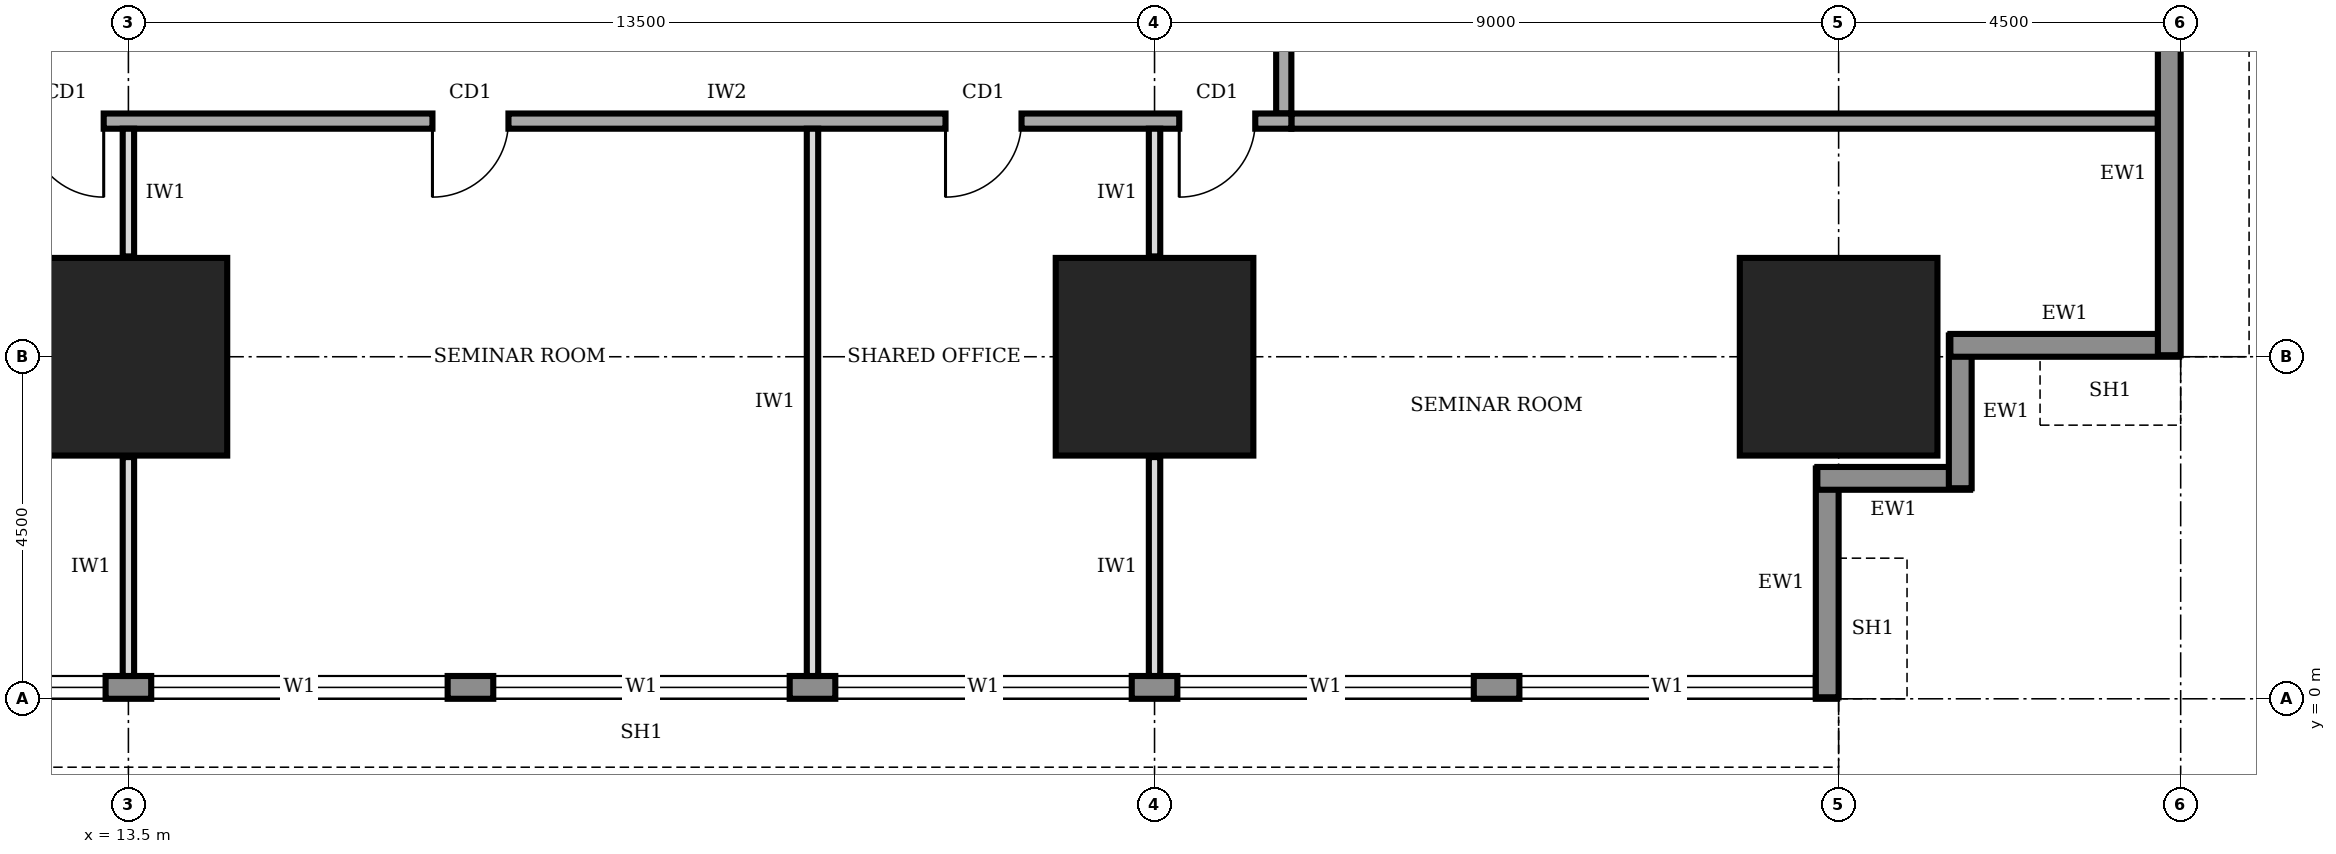
"""IFC4 building model, lengths in metres.
Left out: names, types, materials, properties, quantities, classifications, styles, units other than length and angle.
Written with IfcOpenShell. Run it as: python <this file> out.ifc"""

import sys

from ifc_helpers import new_model, si_unit, direction, frame, frame_2d, origin, origin_2d, place, context, subcontext, project, spatial, rectangle, extrude, element, fill, save


model = new_model("IFC4")
c1 = context("Model", 3, precision=1e-05, world=origin(), true_north=direction((0.0, 1.0)))
c2 = subcontext(c1, "Body", "Model", "MODEL_VIEW")
j1 = project(units=[si_unit("LENGTHUNIT", "METRE"), si_unit("PLANEANGLEUNIT", "RADIAN")], contexts=[c1])
p1 = place(None, origin())
s1 = spatial("IfcSite", under=j1, at=p1, CompositionType="ELEMENT")
p2 = place(p1, origin())
s2 = spatial("IfcBuilding", under=s1, at=p2, CompositionType="ELEMENT")
p3 = place(p2, frame((0.0, 0.0, 25.0)))
s3 = spatial("IfcBuildingStorey", under=s2, at=p3, CompositionType="ELEMENT", Elevation=25.0)
for number, where, z_axis, x_axis in (
    (1, (13.5, 4.5, 0.0), (0.0, 0.0, 1.0), (1.0, 0.0, 0.0)),
    (2, (27.0, 4.5, 0.0), (0.0, 0.0, 1.0), (1.0, 0.0, 0.0)),
    (3, (36.0, 4.5, 0.0), (0.0, 0.0, 1.0), (1.0, 0.0, 0.0)),
):
    element("IfcColumn", number, at=place(p3, frame(where, z_axis=z_axis, x_axis=x_axis)), inside=s3, PredefinedType="COLUMN", context=c2, shape_type="SweptSolid", body=[
        extrude(rectangle(XDim=2.6, YDim=2.6, at=origin_2d()), origin(), (0.0, 0.0, 1.0), 4.0),
    ])
p4 = place(p3, frame((4.52, 0.15, 0.0), z_axis=(0.0, 0.0, 1.0), x_axis=(1.0, 0.0, 0.0)))
e4 = element("IfcWall", 4, at=p4, inside=s3, PredefinedType="STANDARD", context=c2, shape_type="SweptSolid", body=[
    extrude(rectangle(XDim=31.46, YDim=0.3, at=frame_2d((15.73, 0.0))), origin(), (0.0, 0.0, 1.0), 3.75),
])
p5 = place(p4, frame((4.78, 0.0, 0.9)))
e5 = element("IfcOpeningElement", 5, at=p5, cuts=e4, PredefinedType="OPENING", context=c2, shape_type="SweptSolid", body=[
    extrude(rectangle(XDim=3.9, YDim=2.2, at=frame_2d((1.95, 1.1))), frame((0.0, 0.16, 0.0), z_axis=(0.0, -1.0, 0.0), x_axis=(1.0, 0.0, 0.0)), (0.0, 0.0, 1.0), 0.32),
])
p6 = place(p4, frame((9.28, 0.0, 0.9)))
e6 = element("IfcOpeningElement", 6, at=p6, cuts=e4, PredefinedType="OPENING", context=c2, shape_type="SweptSolid", body=[
    extrude(rectangle(XDim=3.9, YDim=2.2, at=frame_2d((1.95, 1.1))), frame((0.0, 0.16, 0.0), z_axis=(0.0, -1.0, 0.0), x_axis=(1.0, 0.0, 0.0)), (0.0, 0.0, 1.0), 0.32),
])
p7 = place(p4, frame((13.78, 0.0, 0.9)))
e7 = element("IfcOpeningElement", 7, at=p7, cuts=e4, PredefinedType="OPENING", context=c2, shape_type="SweptSolid", body=[
    extrude(rectangle(XDim=3.9, YDim=2.2, at=frame_2d((1.95, 1.1))), frame((0.0, 0.16, 0.0), z_axis=(0.0, -1.0, 0.0), x_axis=(1.0, 0.0, 0.0)), (0.0, 0.0, 1.0), 0.32),
])
p8 = place(p4, frame((18.28, 0.0, 0.9)))
e8 = element("IfcOpeningElement", 8, at=p8, cuts=e4, PredefinedType="OPENING", context=c2, shape_type="SweptSolid", body=[
    extrude(rectangle(XDim=3.9, YDim=2.2, at=frame_2d((1.95, 1.1))), frame((0.0, 0.16, 0.0), z_axis=(0.0, -1.0, 0.0), x_axis=(1.0, 0.0, 0.0)), (0.0, 0.0, 1.0), 0.32),
])
p9 = place(p4, frame((22.78, 0.0, 0.9)))
e9 = element("IfcOpeningElement", 9, at=p9, cuts=e4, PredefinedType="OPENING", context=c2, shape_type="SweptSolid", body=[
    extrude(rectangle(XDim=3.9, YDim=2.2, at=frame_2d((1.95, 1.1))), frame((0.0, 0.16, 0.0), z_axis=(0.0, -1.0, 0.0), x_axis=(1.0, 0.0, 0.0)), (0.0, 0.0, 1.0), 0.32),
])
p10 = place(p4, frame((27.28, 0.0, 0.9)))
e10 = element("IfcOpeningElement", 10, at=p10, cuts=e4, PredefinedType="OPENING", context=c2, shape_type="SweptSolid", body=[
    extrude(rectangle(XDim=3.9, YDim=2.2, at=frame_2d((1.95, 1.1))), frame((0.0, 0.16, 0.0), z_axis=(0.0, -1.0, 0.0), x_axis=(1.0, 0.0, 0.0)), (0.0, 0.0, 1.0), 0.32),
])
p11 = place(p3, frame((35.85, 0.02, 0.0), z_axis=(0.0, 0.0, 1.0), x_axis=(0.0, 1.0, 0.0)))
e11 = element("IfcWall", 11, at=p11, inside=s3, PredefinedType="STANDARD", context=c2, shape_type="SweptSolid", body=[
    extrude(rectangle(XDim=3.01, YDim=0.3, at=frame_2d((1.505, 0.0))), origin(), (0.0, 0.0, 1.0), 2.85),
])
for number, where, z_axis, x_axis in (
    (12, (35.72, 2.9, 0.0), (0.0, 0.0, 1.0), (1.0, 0.0, 0.0)),
    (13, (37.6, 2.77, 0.0), (0.0, 0.0, 1.0), (0.0, 1.0, 0.0)),
):
    element("IfcWall", number, at=place(p3, frame(where, z_axis=z_axis, x_axis=x_axis)), inside=s3, PredefinedType="STANDARD", context=c2, shape_type="SweptSolid", body=[
        extrude(rectangle(XDim=2.01, YDim=0.3, at=frame_2d((1.005, 0.0))), origin(), (0.0, 0.0, 1.0), 3.75),
    ])
p12 = place(p3, frame((37.47, 4.65, 0.0), z_axis=(0.0, 0.0, 1.0), x_axis=(1.0, 0.0, 0.0)))
e14 = element("IfcWall", 14, at=p12, inside=s3, PredefinedType="STANDARD", context=c2, shape_type="SweptSolid", body=[
    extrude(rectangle(XDim=3.01, YDim=0.3, at=frame_2d((1.505, 0.0))), origin(), (0.0, 0.0, 1.0), 2.85),
])
p13 = place(p3, frame((40.35, 4.52, 0.0), z_axis=(0.0, 0.0, 1.0), x_axis=(0.0, 1.0, 0.0)))
e15 = element("IfcWall", 15, at=p13, inside=s3, PredefinedType="STANDARD", context=c2, shape_type="SweptSolid", body=[
    extrude(rectangle(XDim=31.46, YDim=0.3, at=frame_2d((15.73, 0.0))), origin(), (0.0, 0.0, 1.0), 3.75),
])
p14 = place(p13, frame((4.78, 0.0, 0.9)))
e16 = element("IfcOpeningElement", 16, at=p14, cuts=e15, PredefinedType="OPENING", context=c2, shape_type="SweptSolid", body=[
    extrude(rectangle(XDim=3.9, YDim=2.2, at=frame_2d((1.95, 1.1))), frame((0.0, 0.16, 0.0), z_axis=(0.0, -1.0, 0.0), x_axis=(1.0, 0.0, 0.0)), (0.0, 0.0, 1.0), 0.32),
])
p15 = place(p13, frame((9.28, 0.0, 0.9)))
e17 = element("IfcOpeningElement", 17, at=p15, cuts=e15, PredefinedType="OPENING", context=c2, shape_type="SweptSolid", body=[
    extrude(rectangle(XDim=3.9, YDim=2.2, at=frame_2d((1.95, 1.1))), frame((0.0, 0.16, 0.0), z_axis=(0.0, -1.0, 0.0), x_axis=(1.0, 0.0, 0.0)), (0.0, 0.0, 1.0), 0.32),
])
p16 = place(p13, frame((13.78, 0.0, 0.9)))
e18 = element("IfcOpeningElement", 18, at=p16, cuts=e15, PredefinedType="OPENING", context=c2, shape_type="SweptSolid", body=[
    extrude(rectangle(XDim=3.9, YDim=2.2, at=frame_2d((1.95, 1.1))), frame((0.0, 0.16, 0.0), z_axis=(0.0, -1.0, 0.0), x_axis=(1.0, 0.0, 0.0)), (0.0, 0.0, 1.0), 0.32),
])
p17 = place(p13, frame((18.28, 0.0, 0.9)))
e19 = element("IfcOpeningElement", 19, at=p17, cuts=e15, PredefinedType="OPENING", context=c2, shape_type="SweptSolid", body=[
    extrude(rectangle(XDim=3.9, YDim=2.2, at=frame_2d((1.95, 1.1))), frame((0.0, 0.16, 0.0), z_axis=(0.0, -1.0, 0.0), x_axis=(1.0, 0.0, 0.0)), (0.0, 0.0, 1.0), 0.32),
])
p18 = place(p13, frame((22.78, 0.0, 0.9)))
e20 = element("IfcOpeningElement", 20, at=p18, cuts=e15, PredefinedType="OPENING", context=c2, shape_type="SweptSolid", body=[
    extrude(rectangle(XDim=3.9, YDim=2.2, at=frame_2d((1.95, 1.1))), frame((0.0, 0.16, 0.0), z_axis=(0.0, -1.0, 0.0), x_axis=(1.0, 0.0, 0.0)), (0.0, 0.0, 1.0), 0.32),
])
p19 = place(p13, frame((27.28, 0.0, 0.9)))
e21 = element("IfcOpeningElement", 21, at=p19, cuts=e15, PredefinedType="OPENING", context=c2, shape_type="SweptSolid", body=[
    extrude(rectangle(XDim=3.9, YDim=2.2, at=frame_2d((1.95, 1.1))), frame((0.0, 0.16, 0.0), z_axis=(0.0, -1.0, 0.0), x_axis=(1.0, 0.0, 0.0)), (0.0, 0.0, 1.0), 0.32),
])
p20 = place(p3, frame((11.9, 7.6, 0.0), z_axis=(0.0, 0.0, 1.0), x_axis=(1.0, 0.0, 0.0)))
e22 = element("IfcWall", 22, at=p20, inside=s3, PredefinedType="SOLIDWALL", context=c2, shape_type="SweptSolid", body=[
    extrude(rectangle(XDim=16.9, YDim=0.2, at=frame_2d((8.45, 0.0))), origin(), (0.0, 0.0, 1.0), 3.75),
])
p21 = place(p20, frame((0.275, 0.0, 0.0)))
e23 = element("IfcOpeningElement", 23, at=p21, cuts=e22, PredefinedType="OPENING", context=c2, shape_type="SweptSolid", body=[
    extrude(rectangle(XDim=1.0, YDim=2.1, at=frame_2d((0.5, 1.05))), frame((0.0, 0.11, 0.0), z_axis=(0.0, -1.0, 0.0), x_axis=(1.0, 0.0, 0.0)), (0.0, 0.0, 1.0), 0.22),
])
p22 = place(p20, frame((5.6, 0.0, 0.0)))
e24 = element("IfcOpeningElement", 24, at=p22, cuts=e22, PredefinedType="OPENING", context=c2, shape_type="SweptSolid", body=[
    extrude(rectangle(XDim=1.0, YDim=2.1, at=frame_2d((0.5, 1.05))), frame((0.0, 0.11, 0.0), z_axis=(0.0, -1.0, 0.0), x_axis=(1.0, 0.0, 0.0)), (0.0, 0.0, 1.0), 0.22),
])
p23 = place(p20, frame((12.35, 0.0, 0.0)))
e25 = element("IfcOpeningElement", 25, at=p23, cuts=e22, PredefinedType="OPENING", context=c2, shape_type="SweptSolid", body=[
    extrude(rectangle(XDim=1.0, YDim=2.1, at=frame_2d((0.5, 1.05))), frame((0.0, 0.11, 0.0), z_axis=(0.0, -1.0, 0.0), x_axis=(1.0, 0.0, 0.0)), (0.0, 0.0, 1.0), 0.22),
])
p24 = place(p20, frame((15.425, 0.0, 0.0)))
e26 = element("IfcOpeningElement", 26, at=p24, cuts=e22, PredefinedType="OPENING", context=c2, shape_type="SweptSolid", body=[
    extrude(rectangle(XDim=1.0, YDim=2.1, at=frame_2d((0.5, 1.05))), frame((0.0, 0.11, 0.0), z_axis=(0.0, -1.0, 0.0), x_axis=(1.0, 0.0, 0.0)), (0.0, 0.0, 1.0), 0.22),
])
p25 = place(p3, frame((28.7, 7.7, 0.0), z_axis=(0.0, 0.0, 1.0), x_axis=(0.0, 1.0, 0.0)))
e27 = element("IfcWall", 27, at=p25, inside=s3, PredefinedType="SOLIDWALL", context=c2, shape_type="SweptSolid", body=[
    extrude(rectangle(XDim=23.8, YDim=0.2, at=frame_2d((11.9, 0.0))), origin(), (0.0, 0.0, 1.0), 3.75),
])
p26 = place(p25, frame((2.3, 0.0, 0.0)))
e28 = element("IfcOpeningElement", 28, at=p26, cuts=e27, PredefinedType="OPENING", context=c2, shape_type="SweptSolid", body=[
    extrude(rectangle(XDim=1.0, YDim=2.1, at=frame_2d((0.5, 1.05))), frame((0.0, 0.11, 0.0), z_axis=(0.0, -1.0, 0.0), x_axis=(1.0, 0.0, 0.0)), (0.0, 0.0, 1.0), 0.22),
])
p27 = place(p25, frame((7.55, 0.0, 0.0)))
e29 = element("IfcOpeningElement", 29, at=p27, cuts=e27, PredefinedType="OPENING", context=c2, shape_type="SweptSolid", body=[
    extrude(rectangle(XDim=1.0, YDim=2.1, at=frame_2d((0.5, 1.05))), frame((0.0, 0.11, 0.0), z_axis=(0.0, -1.0, 0.0), x_axis=(1.0, 0.0, 0.0)), (0.0, 0.0, 1.0), 0.22),
])
p28 = place(p25, frame((12.05, 0.0, 0.0)))
e30 = element("IfcOpeningElement", 30, at=p28, cuts=e27, PredefinedType="OPENING", context=c2, shape_type="SweptSolid", body=[
    extrude(rectangle(XDim=1.0, YDim=2.1, at=frame_2d((0.5, 1.05))), frame((0.0, 0.11, 0.0), z_axis=(0.0, -1.0, 0.0), x_axis=(1.0, 0.0, 0.0)), (0.0, 0.0, 1.0), 0.22),
])
p29 = place(p25, frame((18.4, 0.0, 0.0)))
e31 = element("IfcOpeningElement", 31, at=p29, cuts=e27, PredefinedType="OPENING", context=c2, shape_type="SweptSolid", body=[
    extrude(rectangle(XDim=1.8, YDim=2.1, at=frame_2d((0.9, 1.05))), frame((0.0, 0.11, 0.0), z_axis=(0.0, -1.0, 0.0), x_axis=(1.0, 0.0, 0.0)), (0.0, 0.0, 1.0), 0.22),
])
p30 = place(p3, frame((28.8, 7.6, 0.0), z_axis=(0.0, 0.0, 1.0), x_axis=(1.0, 0.0, 0.0)))
e32 = element("IfcWall", 32, at=p30, inside=s3, PredefinedType="SOLIDWALL", context=c2, shape_type="SweptSolid", body=[
    extrude(rectangle(XDim=11.4, YDim=0.2, at=frame_2d((5.7, 0.0))), origin(), (0.0, 0.0, 1.0), 3.75),
])
p31 = place(p3, frame((13.5, 0.3, 0.0), z_axis=(0.0, 0.0, 1.0), x_axis=(0.0, 1.0, 0.0)))
e33 = element("IfcWall", 33, at=p31, inside=s3, PredefinedType="PARTITIONING", context=c2, shape_type="SweptSolid", body=[
    extrude(rectangle(XDim=2.88, YDim=0.15, at=frame_2d((1.44, 0.0))), origin(), (0.0, 0.0, 1.0), 2.85),
])
p32 = place(p3, frame((13.5, 5.82, 0.0), z_axis=(0.0, 0.0, 1.0), x_axis=(0.0, 1.0, 0.0)))
e34 = element("IfcWall", 34, at=p32, inside=s3, PredefinedType="PARTITIONING", context=c2, shape_type="SweptSolid", body=[
    extrude(rectangle(XDim=1.68, YDim=0.15, at=frame_2d((0.84, 0.0))), origin(), (0.0, 0.0, 1.0), 2.85),
])
p33 = place(p3, frame((22.5, 0.3, 0.0), z_axis=(0.0, 0.0, 1.0), x_axis=(0.0, 1.0, 0.0)))
e35 = element("IfcWall", 35, at=p33, inside=s3, PredefinedType="PARTITIONING", context=c2, shape_type="SweptSolid", body=[
    extrude(rectangle(XDim=7.2, YDim=0.15, at=frame_2d((3.6, 0.0))), origin(), (0.0, 0.0, 1.0), 3.75),
])
p34 = place(p3, frame((27.0, 0.3, 0.0), z_axis=(0.0, 0.0, 1.0), x_axis=(0.0, 1.0, 0.0)))
e36 = element("IfcWall", 36, at=p34, inside=s3, PredefinedType="PARTITIONING", context=c2, shape_type="SweptSolid", body=[
    extrude(rectangle(XDim=2.88, YDim=0.15, at=frame_2d((1.44, 0.0))), origin(), (0.0, 0.0, 1.0), 2.85),
])
p35 = place(p3, frame((27.0, 5.82, 0.0), z_axis=(0.0, 0.0, 1.0), x_axis=(0.0, 1.0, 0.0)))
e37 = element("IfcWall", 37, at=p35, inside=s3, PredefinedType="PARTITIONING", context=c2, shape_type="SweptSolid", body=[
    extrude(rectangle(XDim=1.68, YDim=0.15, at=frame_2d((0.84, 0.0))), origin(), (0.0, 0.0, 1.0), 2.85),
])
p36 = place(p5, origin())
e38 = element("IfcWindow", 38, at=p36, inside=s3, PartitioningType="SINGLE_PANEL", PredefinedType="WINDOW", context=c2, shape_type="SweptSolid", body=[
    extrude(rectangle(XDim=3.9, YDim=2.2, at=frame_2d((1.95, 1.1))), frame((0.0, 0.03, 0.0), z_axis=(0.0, -1.0, 0.0), x_axis=(1.0, 0.0, 0.0)), (0.0, 0.0, 1.0), 0.06),
])
fill(e5, e38)
p37 = place(p6, origin())
e39 = element("IfcWindow", 39, at=p37, inside=s3, PartitioningType="SINGLE_PANEL", PredefinedType="WINDOW", context=c2, shape_type="SweptSolid", body=[
    extrude(rectangle(XDim=3.9, YDim=2.2, at=frame_2d((1.95, 1.1))), frame((0.0, 0.03, 0.0), z_axis=(0.0, -1.0, 0.0), x_axis=(1.0, 0.0, 0.0)), (0.0, 0.0, 1.0), 0.06),
])
fill(e6, e39)
p38 = place(p7, origin())
e40 = element("IfcWindow", 40, at=p38, inside=s3, PartitioningType="SINGLE_PANEL", PredefinedType="WINDOW", context=c2, shape_type="SweptSolid", body=[
    extrude(rectangle(XDim=3.9, YDim=2.2, at=frame_2d((1.95, 1.1))), frame((0.0, 0.03, 0.0), z_axis=(0.0, -1.0, 0.0), x_axis=(1.0, 0.0, 0.0)), (0.0, 0.0, 1.0), 0.06),
])
fill(e7, e40)
p39 = place(p8, origin())
e41 = element("IfcWindow", 41, at=p39, inside=s3, PartitioningType="SINGLE_PANEL", PredefinedType="WINDOW", context=c2, shape_type="SweptSolid", body=[
    extrude(rectangle(XDim=3.9, YDim=2.2, at=frame_2d((1.95, 1.1))), frame((0.0, 0.03, 0.0), z_axis=(0.0, -1.0, 0.0), x_axis=(1.0, 0.0, 0.0)), (0.0, 0.0, 1.0), 0.06),
])
fill(e8, e41)
p40 = place(p9, origin())
e42 = element("IfcWindow", 42, at=p40, inside=s3, PartitioningType="SINGLE_PANEL", PredefinedType="WINDOW", context=c2, shape_type="SweptSolid", body=[
    extrude(rectangle(XDim=3.9, YDim=2.2, at=frame_2d((1.95, 1.1))), frame((0.0, 0.03, 0.0), z_axis=(0.0, -1.0, 0.0), x_axis=(1.0, 0.0, 0.0)), (0.0, 0.0, 1.0), 0.06),
])
fill(e9, e42)
p41 = place(p10, origin())
e43 = element("IfcWindow", 43, at=p41, inside=s3, PartitioningType="SINGLE_PANEL", PredefinedType="WINDOW", context=c2, shape_type="SweptSolid", body=[
    extrude(rectangle(XDim=3.9, YDim=2.2, at=frame_2d((1.95, 1.1))), frame((0.0, 0.03, 0.0), z_axis=(0.0, -1.0, 0.0), x_axis=(1.0, 0.0, 0.0)), (0.0, 0.0, 1.0), 0.06),
])
fill(e10, e43)
p42 = place(p21, frame((1.0, 0.0, 0.0), z_axis=(0.0, 0.0, 1.0), x_axis=(-1.0, 0.0, 0.0)))
e44 = element("IfcDoor", 44, at=p42, inside=s3, OperationType="SINGLE_SWING_LEFT", PredefinedType="DOOR", context=c2, shape_type="SweptSolid", body=[
    extrude(rectangle(XDim=1.0, YDim=2.1, at=frame_2d((0.5, 1.05))), frame((0.0, 0.025, 0.0), z_axis=(0.0, -1.0, 0.0), x_axis=(1.0, 0.0, 0.0)), (0.0, 0.0, 1.0), 0.05),
])
fill(e23, e44)
p43 = place(p22, frame((1.0, 0.0, 0.0), z_axis=(0.0, 0.0, 1.0), x_axis=(-1.0, 0.0, 0.0)))
e45 = element("IfcDoor", 45, at=p43, inside=s3, OperationType="SINGLE_SWING_RIGHT", PredefinedType="DOOR", context=c2, shape_type="SweptSolid", body=[
    extrude(rectangle(XDim=1.0, YDim=2.1, at=frame_2d((0.5, 1.05))), frame((0.0, 0.025, 0.0), z_axis=(0.0, -1.0, 0.0), x_axis=(1.0, 0.0, 0.0)), (0.0, 0.0, 1.0), 0.05),
])
fill(e24, e45)
p44 = place(p23, frame((1.0, 0.0, 0.0), z_axis=(0.0, 0.0, 1.0), x_axis=(-1.0, 0.0, 0.0)))
e46 = element("IfcDoor", 46, at=p44, inside=s3, OperationType="SINGLE_SWING_RIGHT", PredefinedType="DOOR", context=c2, shape_type="SweptSolid", body=[
    extrude(rectangle(XDim=1.0, YDim=2.1, at=frame_2d((0.5, 1.05))), frame((0.0, 0.025, 0.0), z_axis=(0.0, -1.0, 0.0), x_axis=(1.0, 0.0, 0.0)), (0.0, 0.0, 1.0), 0.05),
])
fill(e25, e46)
p45 = place(p24, frame((1.0, 0.0, 0.0), z_axis=(0.0, 0.0, 1.0), x_axis=(-1.0, 0.0, 0.0)))
e47 = element("IfcDoor", 47, at=p45, inside=s3, OperationType="SINGLE_SWING_RIGHT", PredefinedType="DOOR", context=c2, shape_type="SweptSolid", body=[
    extrude(rectangle(XDim=1.0, YDim=2.1, at=frame_2d((0.5, 1.05))), frame((0.0, 0.025, 0.0), z_axis=(0.0, -1.0, 0.0), x_axis=(1.0, 0.0, 0.0)), (0.0, 0.0, 1.0), 0.05),
])
fill(e26, e47)
save(model, sys.argv[1])
